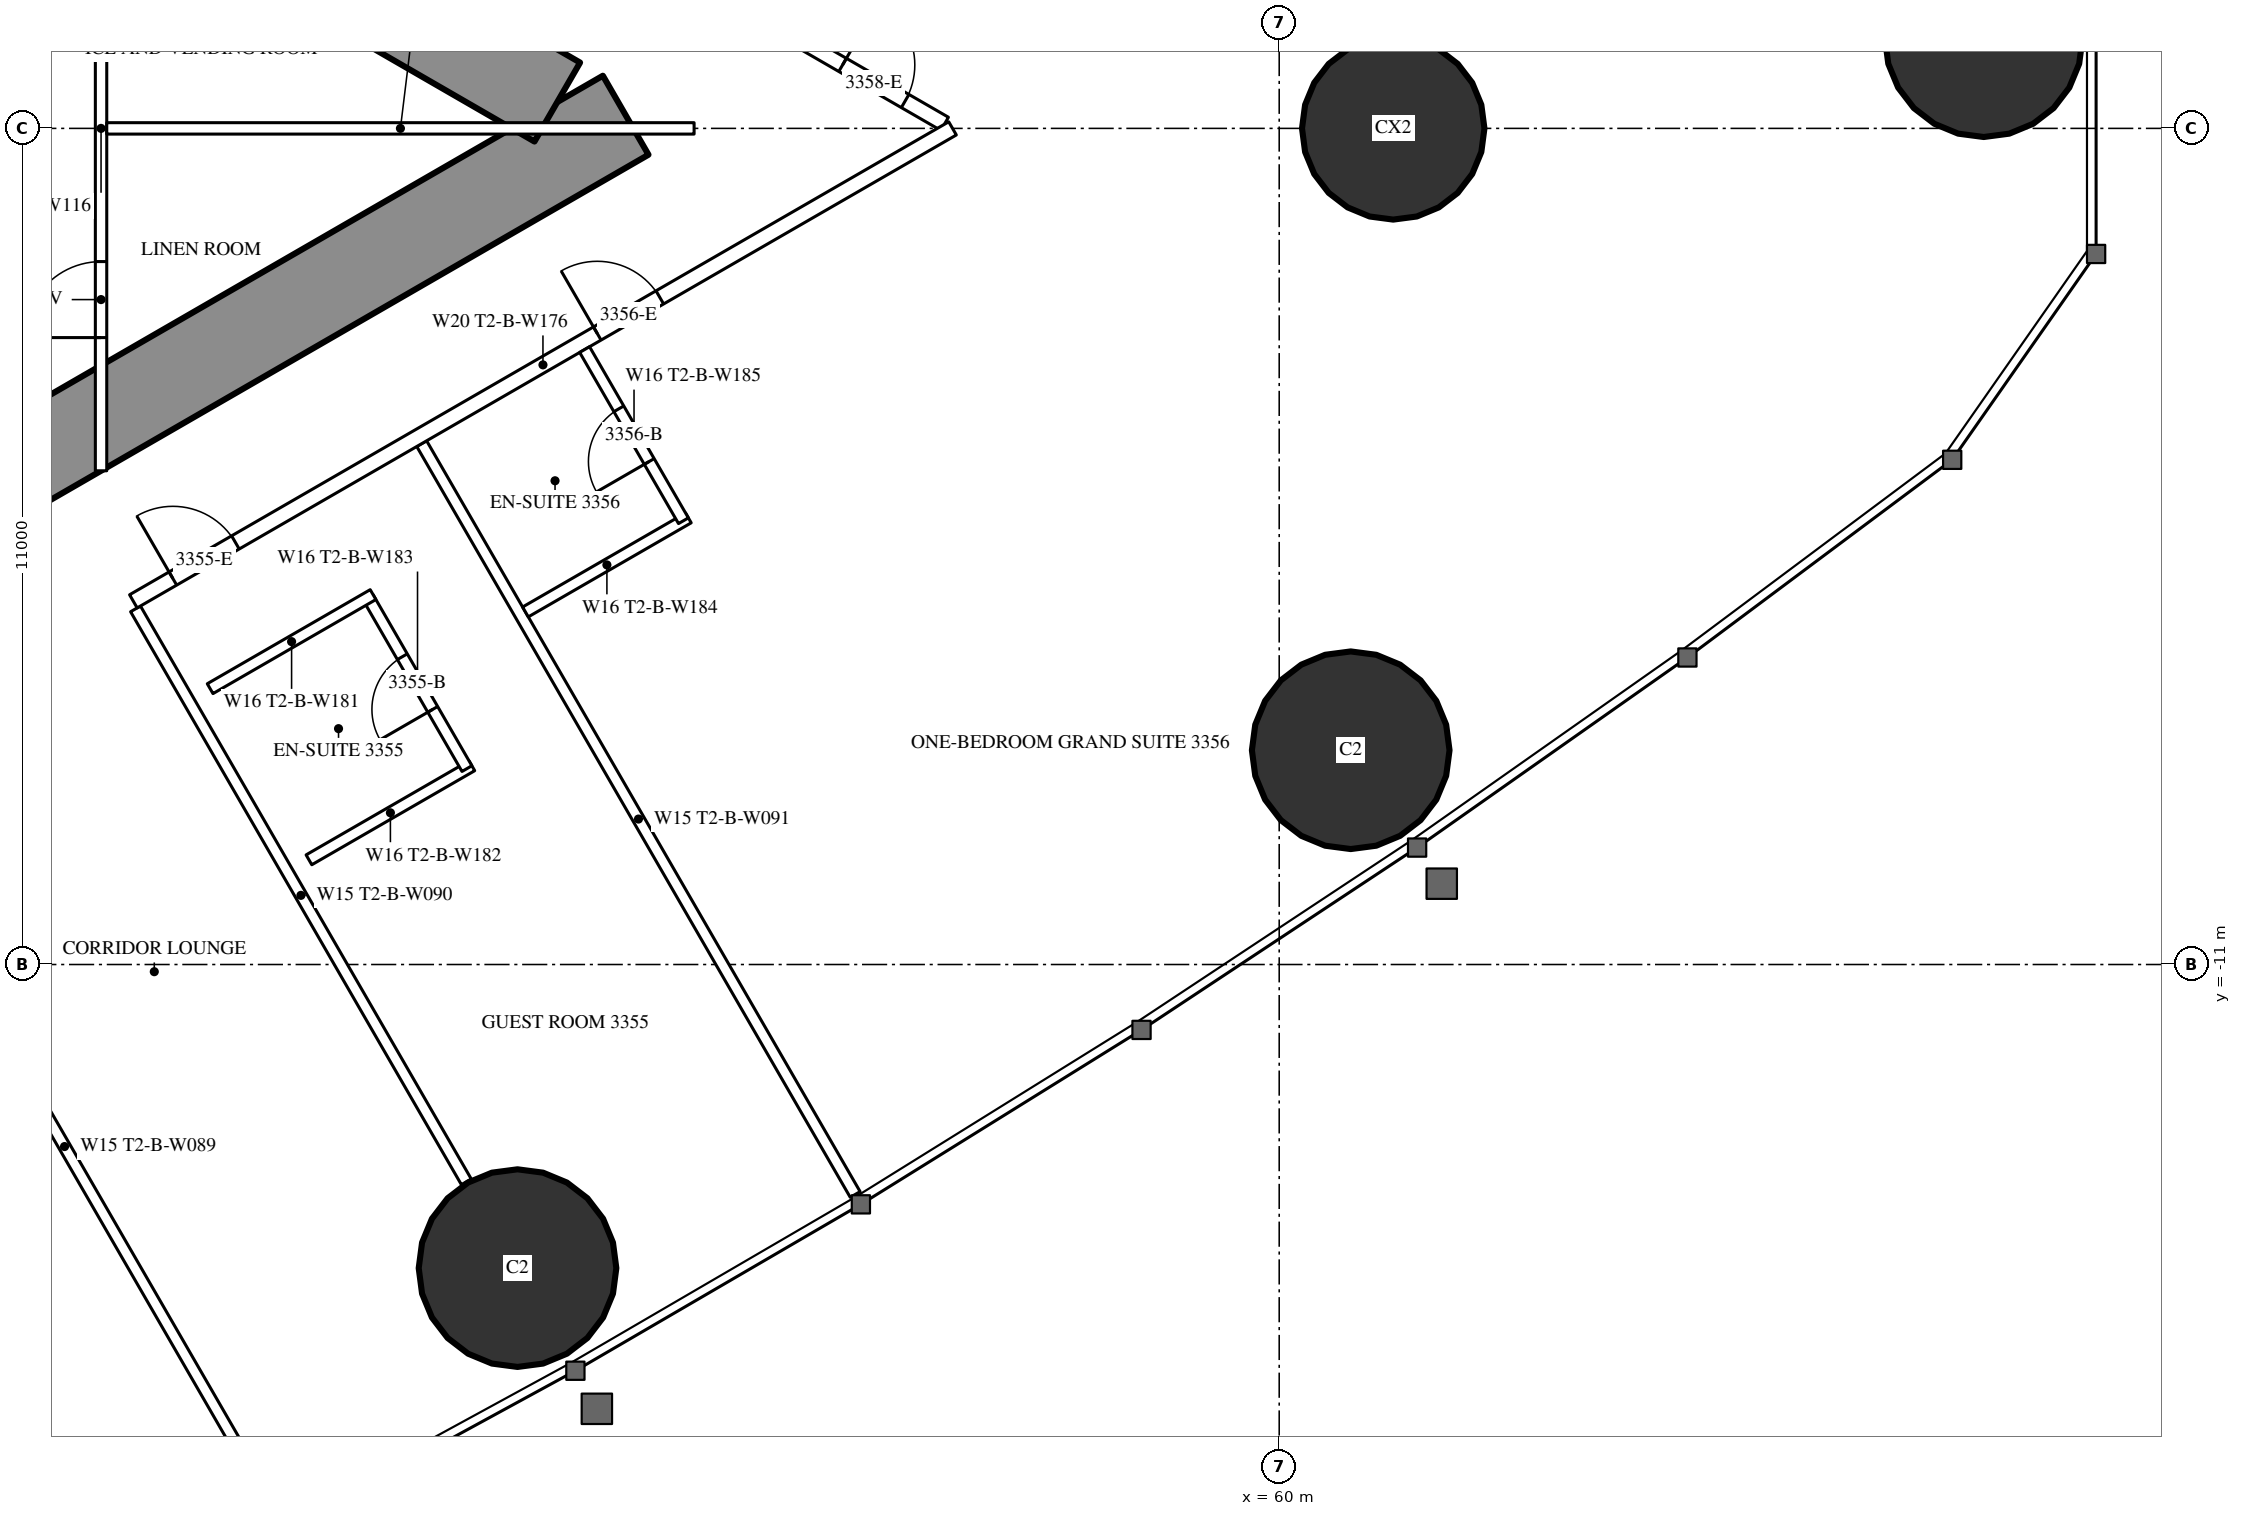
"""IFC4 building model, lengths in metres.
Left out: names, types, materials, properties, quantities, classifications, styles, units other than length and angle.
Written with IfcOpenShell. Run it as: python <this file> out.ifc"""

import sys

from ifc_helpers import new_model, si_unit, direction, frame, frame_2d, origin, origin_2d, place, context, subcontext, project, spatial, rectangle, circle, hollow_circle, extrude, element, fill, save


model = new_model("IFC4")
c1 = context("Model", 3, precision=1e-05, world=origin(), true_north=direction((0.0, 1.0)))
c2 = subcontext(c1, "Body", "Model", "MODEL_VIEW")
j1 = project(units=[si_unit("LENGTHUNIT", "METRE"), si_unit("PLANEANGLEUNIT", "RADIAN")], contexts=[c1])
p1 = place(None, origin())
s1 = spatial("IfcSite", under=j1, at=p1, CompositionType="ELEMENT")
p2 = place(p1, origin())
s2 = spatial("IfcBuilding", under=s1, at=p2, CompositionType="ELEMENT")
p3 = place(p2, frame((0.0, 0.0, 125.6)))
s3 = spatial("IfcBuildingStorey", under=s2, at=p3, CompositionType="ELEMENT", Elevation=125.6)
for number, where, z_axis, x_axis in (
    (1, (69.269, 1.187, 0.0), (0.0, 0.0, 1.0), (1.0, 0.0, 0.0)),
    (2, (49.979, -14.994, 0.0), (0.0, 0.0, 1.0), (1.0, 0.0, 0.0)),
    (3, (60.941, -8.181, 0.0), (0.0, 0.0, 1.0), (1.0, 0.0, 0.0)),
):
    element("IfcColumn", number, at=place(p3, frame(where, z_axis=z_axis, x_axis=x_axis)), inside=s3, PredefinedType="COLUMN", context=c2, shape_type="SweptSolid", body=[
        extrude(hollow_circle(Radius=1.3, WallThickness=0.1, at=origin_2d()), origin(), (0.0, 0.0, 1.0), 3.5),
    ])
p4 = place(p3, frame((61.5, 0.0, 0.0), z_axis=(0.0, 0.0, 1.0), x_axis=(1.0, 0.0, 0.0)))
e4 = element("IfcColumn", 4, at=p4, inside=s3, PredefinedType="COLUMN", context=c2, shape_type="SweptSolid", body=[
    extrude(circle(Radius=1.2, at=origin_2d()), origin(), (0.0, 0.0, 1.0), 3.5),
])
p5 = place(p3, frame((27.2, -13.8, 0.0), z_axis=(0.0, 0.0, 1.0), x_axis=(0.866027159892, 0.499996958321, 0.0)))
e5 = element("IfcWall", 5, at=p5, inside=s3, PredefinedType="SHEAR", context=c2, shape_type="SweptSolid", body=[
    extrude(rectangle(XDim=27.947, YDim=1.2, at=frame_2d((13.973, 0.0))), origin(), (0.0, 0.0, 1.0), 3.5),
])
p6 = place(p5, frame((4.6, 0.0, 0.0)))
e6 = element("IfcOpeningElement", 6, at=p6, cuts=e5, PredefinedType="OPENING", context=c2, shape_type="SweptSolid", body=[
    extrude(rectangle(XDim=1.0, YDim=2.2, at=frame_2d((0.5, 1.1))), frame((0.0, 0.61, 0.0), z_axis=(0.0, -1.0, 0.0), x_axis=(1.0, 0.0, 0.0)), (0.0, 0.0, 1.0), 1.22),
])
p7 = place(p5, frame((13.395, 0.0, 0.0)))
e7 = element("IfcOpeningElement", 7, at=p7, cuts=e5, PredefinedType="OPENING", context=c2, shape_type="SweptSolid", body=[
    extrude(rectangle(XDim=1.8, YDim=2.2, at=frame_2d((0.9, 1.1))), frame((0.0, 0.61, 0.0), z_axis=(0.0, -1.0, 0.0), x_axis=(1.0, 0.0, 0.0)), (0.0, 0.0, 1.0), 1.22),
])
p8 = place(p3, frame((27.2, 13.8, 0.0), z_axis=(0.0, 0.0, 1.0), x_axis=(0.866024515034, -0.500001539357, 0.0)))
e8 = element("IfcWall", 8, at=p8, inside=s3, PredefinedType="SHEAR", context=c2, shape_type="SweptSolid", body=[
    extrude(rectangle(XDim=26.907, YDim=1.2, at=frame_2d((13.454, 0.0))), origin(), (0.0, 0.0, 1.0), 3.5),
])
p9 = place(p8, frame((4.6, 0.0, 0.0)))
e9 = element("IfcOpeningElement", 9, at=p9, cuts=e8, PredefinedType="OPENING", context=c2, shape_type="SweptSolid", body=[
    extrude(rectangle(XDim=1.0, YDim=2.2, at=frame_2d((0.5, 1.1))), frame((0.0, 0.61, 0.0), z_axis=(0.0, -1.0, 0.0), x_axis=(1.0, 0.0, 0.0)), (0.0, 0.0, 1.0), 1.22),
])
p10 = place(p8, frame((13.395, 0.0, 0.0)))
e10 = element("IfcOpeningElement", 10, at=p10, cuts=e8, PredefinedType="OPENING", context=c2, shape_type="SweptSolid", body=[
    extrude(rectangle(XDim=1.8, YDim=2.2, at=frame_2d((0.9, 1.1))), frame((0.0, 0.61, 0.0), z_axis=(0.0, -1.0, 0.0), x_axis=(1.0, 0.0, 0.0)), (0.0, 0.0, 1.0), 1.22),
])
p11 = place(p3, frame((41.19, -8.494, 0.0), z_axis=(0.0, 0.0, 1.0), x_axis=(0.49999258054, -0.866029687369, 0.0)))
e11 = element("IfcWall", 11, at=p11, inside=s3, PredefinedType="PARTITIONING", context=c2, shape_type="SweptSolid", body=[
    extrude(rectangle(XDim=11.318, YDim=0.15, at=frame_2d((5.659, 0.0))), origin(), (0.0, 0.0, 1.0), 3.25),
])
p12 = place(p3, frame((44.954, -6.321, 0.0), z_axis=(0.0, 0.0, 1.0), x_axis=(0.500018676722, -0.866014620505, 0.0)))
e12 = element("IfcWall", 12, at=p12, inside=s3, PredefinedType="PARTITIONING", context=c2, shape_type="SweptSolid", body=[
    extrude(rectangle(XDim=8.704, YDim=0.15, at=frame_2d((4.352, 0.0))), origin(), (0.0, 0.0, 1.0), 2.2),
])
p13 = place(p3, frame((48.719, -4.147, 0.0), z_axis=(0.0, 0.0, 1.0), x_axis=(0.499990498062, -0.866030889661, 0.0)))
e13 = element("IfcWall", 13, at=p13, inside=s3, PredefinedType="PARTITIONING", context=c2, shape_type="SweptSolid", body=[
    extrude(rectangle(XDim=11.406, YDim=0.15, at=frame_2d((5.703, 0.0))), origin(), (0.0, 0.0, 1.0), 3.25),
])
p14 = place(p3, frame((36.834, 10.894, 0.0), z_axis=(0.0, 0.0, 1.0), x_axis=(0.866028157229, -0.499995230863, 0.0)))
e14 = element("IfcWall", 14, at=p14, inside=s3, PredefinedType="PARTITIONING", context=c2, shape_type="SweptSolid", body=[
    extrude(rectangle(XDim=21.667, YDim=0.2, at=frame_2d((10.833, 0.0))), origin(), (0.0, 0.0, 1.0), 3.25),
])
p15 = place(p14, frame((20.117, 0.0, 0.0)))
e15 = element("IfcOpeningElement", 15, at=p15, cuts=e14, PredefinedType="OPENING", context=c2, shape_type="SweptSolid", body=[
    extrude(rectangle(XDim=0.95, YDim=2.2, at=frame_2d((0.475, 1.1))), frame((0.0, 0.11, 0.0), z_axis=(0.0, -1.0, 0.0), x_axis=(1.0, 0.0, 0.0)), (0.0, 0.0, 1.0), 0.22),
])
p16 = place(p14, frame((14.04, 0.0, 0.0)))
e16 = element("IfcOpeningElement", 16, at=p16, cuts=e14, PredefinedType="OPENING", context=c2, shape_type="SweptSolid", body=[
    extrude(rectangle(XDim=0.95, YDim=2.2, at=frame_2d((0.475, 1.1))), frame((0.0, 0.11, 0.0), z_axis=(0.0, -1.0, 0.0), x_axis=(1.0, 0.0, 0.0)), (0.0, 0.0, 1.0), 0.22),
])
p17 = place(p14, frame((7.697, 0.0, 0.0)))
e17 = element("IfcOpeningElement", 17, at=p17, cuts=e14, PredefinedType="OPENING", context=c2, shape_type="SweptSolid", body=[
    extrude(rectangle(XDim=0.95, YDim=2.2, at=frame_2d((0.475, 1.1))), frame((0.0, 0.11, 0.0), z_axis=(0.0, -1.0, 0.0), x_axis=(1.0, 0.0, 0.0)), (0.0, 0.0, 1.0), 0.22),
])
p18 = place(p14, frame((3.35, 0.0, 0.0)))
e18 = element("IfcOpeningElement", 18, at=p18, cuts=e14, PredefinedType="OPENING", context=c2, shape_type="SweptSolid", body=[
    extrude(rectangle(XDim=1.0, YDim=2.2, at=frame_2d((0.5, 1.1))), frame((0.0, 0.11, 0.0), z_axis=(0.0, -1.0, 0.0), x_axis=(1.0, 0.0, 0.0)), (0.0, 0.0, 1.0), 0.22),
])
p19 = place(p3, frame((44.925, -6.222, 0.0), z_axis=(0.0, 0.0, 1.0), x_axis=(0.866020269055, 0.500008893506, 0.0)))
e19 = element("IfcWall", 19, at=p19, inside=s3, PredefinedType="PARTITIONING", context=c2, shape_type="SweptSolid", body=[
    extrude(rectangle(XDim=12.444, YDim=0.2, at=frame_2d((6.222, 0.0))), origin(), (0.0, 0.0, 1.0), 3.25),
])
p20 = place(p19, frame((0.6, 0.0, 0.0)))
e20 = element("IfcOpeningElement", 20, at=p20, cuts=e19, PredefinedType="OPENING", context=c2, shape_type="SweptSolid", body=[
    extrude(rectangle(XDim=0.95, YDim=2.2, at=frame_2d((0.475, 1.1))), frame((0.0, 0.11, 0.0), z_axis=(0.0, -1.0, 0.0), x_axis=(1.0, 0.0, 0.0)), (0.0, 0.0, 1.0), 0.22),
])
p21 = place(p19, frame((7.047, 0.0, 0.0)))
e21 = element("IfcOpeningElement", 21, at=p21, cuts=e19, PredefinedType="OPENING", context=c2, shape_type="SweptSolid", body=[
    extrude(rectangle(XDim=0.95, YDim=2.2, at=frame_2d((0.475, 1.1))), frame((0.0, 0.11, 0.0), z_axis=(0.0, -1.0, 0.0), x_axis=(1.0, 0.0, 0.0)), (0.0, 0.0, 1.0), 0.22),
])
p22 = place(p3, frame((47.235, -9.623, 0.0), z_axis=(0.0, 0.0, 1.0), x_axis=(0.866006523861, 0.500032699561, 0.0)))
e22 = element("IfcWall", 22, at=p22, inside=s3, PredefinedType="PARTITIONING", context=c2, shape_type="SweptSolid", body=[
    extrude(rectangle(XDim=2.475, YDim=0.15, at=frame_2d((1.237, 0.0))), origin(), (0.0, 0.0, 1.0), 3.25),
])
p23 = place(p3, frame((48.013, -6.171, 0.0), z_axis=(0.0, 0.0, 1.0), x_axis=(0.500006934395, -0.866021400173, 0.0)))
e23 = element("IfcWall", 23, at=p23, inside=s3, PredefinedType="PARTITIONING", context=c2, shape_type="SweptSolid", body=[
    extrude(rectangle(XDim=2.6, YDim=0.15, at=frame_2d((1.3, 0.0))), origin(), (0.0, 0.0, 1.0), 3.25),
])
p24 = place(p23, frame((0.9, 0.0, 0.0)))
e24 = element("IfcOpeningElement", 24, at=p24, cuts=e23, PredefinedType="OPENING", context=c2, shape_type="SweptSolid", body=[
    extrude(rectangle(XDim=0.8, YDim=2.2, at=frame_2d((0.4, 1.1))), frame((0.0, 0.085, 0.0), z_axis=(0.0, -1.0, 0.0), x_axis=(1.0, 0.0, 0.0)), (0.0, 0.0, 1.0), 0.17),
])
p25 = place(p3, frame((45.935, -7.371, 0.0), z_axis=(0.0, 0.0, 1.0), x_axis=(0.866031185235, 0.4999899861, 0.0)))
e25 = element("IfcWall", 25, at=p25, inside=s3, PredefinedType="PARTITIONING", context=c2, shape_type="SweptSolid", body=[
    extrude(rectangle(XDim=2.475, YDim=0.15, at=frame_2d((1.238, 0.0))), origin(), (0.0, 0.0, 1.0), 3.25),
])
p26 = place(p3, frame((50.083, -6.362, 0.0), z_axis=(0.0, 0.0, 1.0), x_axis=(0.866006523861, 0.500032699561, 0.0)))
e26 = element("IfcWall", 26, at=p26, inside=s3, PredefinedType="PARTITIONING", context=c2, shape_type="SweptSolid", body=[
    extrude(rectangle(XDim=2.475, YDim=0.15, at=frame_2d((1.237, 0.0))), origin(), (0.0, 0.0, 1.0), 3.25),
])
p27 = place(p3, frame((50.862, -2.91, 0.0), z_axis=(0.0, 0.0, 1.0), x_axis=(0.500047596559, -0.865997922154, 0.0)))
e27 = element("IfcWall", 27, at=p27, inside=s3, PredefinedType="PARTITIONING", context=c2, shape_type="SweptSolid", body=[
    extrude(rectangle(XDim=2.6, YDim=0.15, at=frame_2d((1.3, 0.0))), origin(), (0.0, 0.0, 1.0), 3.25),
])
p28 = place(p27, frame((0.9, 0.0, 0.0)))
e28 = element("IfcOpeningElement", 28, at=p28, cuts=e27, PredefinedType="OPENING", context=c2, shape_type="SweptSolid", body=[
    extrude(rectangle(XDim=0.8, YDim=2.2, at=frame_2d((0.4, 1.1))), frame((0.0, 0.085, 0.0), z_axis=(0.0, -1.0, 0.0), x_axis=(1.0, 0.0, 0.0)), (0.0, 0.0, 1.0), 0.17),
])
p29 = place(p3, frame((44.5, -4.505, 0.0), z_axis=(0.0, 0.0, 1.0), x_axis=(0.0, 1.0, 0.0)))
e29 = element("IfcWall", 29, at=p29, inside=s3, PredefinedType="PARTITIONING", context=c2, shape_type="SweptSolid", body=[
    extrude(rectangle(XDim=9.009, YDim=0.15, at=frame_2d((4.505, 0.0))), origin(), (0.0, 0.0, 1.0), 2.45),
])
p30 = place(p29, frame((1.752, 0.0, 0.0)))
e30 = element("IfcOpeningElement", 30, at=p30, cuts=e29, PredefinedType="OPENING", context=c2, shape_type="SweptSolid", body=[
    extrude(rectangle(XDim=1.0, YDim=2.2, at=frame_2d((0.5, 1.1))), frame((0.0, 0.085, 0.0), z_axis=(0.0, -1.0, 0.0), x_axis=(1.0, 0.0, 0.0)), (0.0, 0.0, 1.0), 0.17),
])
p31 = place(p29, frame((6.257, 0.0, 0.0)))
e31 = element("IfcOpeningElement", 31, at=p31, cuts=e29, PredefinedType="OPENING", context=c2, shape_type="SweptSolid", body=[
    extrude(rectangle(XDim=1.0, YDim=2.2, at=frame_2d((0.5, 1.1))), frame((0.0, 0.085, 0.0), z_axis=(0.0, -1.0, 0.0), x_axis=(1.0, 0.0, 0.0)), (0.0, 0.0, 1.0), 0.17),
])
p32 = place(p3, frame((44.575, 0.0, 0.0), z_axis=(0.0, 0.0, 1.0), x_axis=(1.0, 0.0, 0.0)))
e32 = element("IfcWall", 32, at=p32, inside=s3, PredefinedType="PARTITIONING", context=c2, shape_type="SweptSolid", body=[
    extrude(rectangle(XDim=7.727, YDim=0.15, at=frame_2d((3.864, 0.0))), origin(), (0.0, 0.0, 1.0), 2.2),
])
p33 = place(p24, origin())
e33 = element("IfcDoor", 33, at=p33, inside=s3, OperationType="SINGLE_SWING_RIGHT", PredefinedType="DOOR", context=c2, shape_type="SweptSolid", body=[
    extrude(rectangle(XDim=0.8, YDim=2.2, at=frame_2d((0.4, 1.1))), frame((0.0, 0.025, 0.0), z_axis=(0.0, -1.0, 0.0), x_axis=(1.0, 0.0, 0.0)), (0.0, 0.0, 1.0), 0.05),
])
fill(e24, e33)
p34 = place(p20, origin())
e34 = element("IfcDoor", 34, at=p34, inside=s3, OperationType="SINGLE_SWING_LEFT", PredefinedType="DOOR", context=c2, shape_type="SweptSolid", body=[
    extrude(rectangle(XDim=0.95, YDim=2.2, at=frame_2d((0.475, 1.1))), frame((0.0, 0.025, 0.0), z_axis=(0.0, -1.0, 0.0), x_axis=(1.0, 0.0, 0.0)), (0.0, 0.0, 1.0), 0.05),
])
fill(e20, e34)
p35 = place(p28, origin())
e35 = element("IfcDoor", 35, at=p35, inside=s3, OperationType="SINGLE_SWING_RIGHT", PredefinedType="DOOR", context=c2, shape_type="SweptSolid", body=[
    extrude(rectangle(XDim=0.8, YDim=2.2, at=frame_2d((0.4, 1.1))), frame((0.0, 0.025, 0.0), z_axis=(0.0, -1.0, 0.0), x_axis=(1.0, 0.0, 0.0)), (0.0, 0.0, 1.0), 0.05),
])
fill(e28, e35)
p36 = place(p21, origin())
e36 = element("IfcDoor", 36, at=p36, inside=s3, OperationType="SINGLE_SWING_LEFT", PredefinedType="DOOR", context=c2, shape_type="SweptSolid", body=[
    extrude(rectangle(XDim=0.95, YDim=2.2, at=frame_2d((0.475, 1.1))), frame((0.0, 0.025, 0.0), z_axis=(0.0, -1.0, 0.0), x_axis=(1.0, 0.0, 0.0)), (0.0, 0.0, 1.0), 0.05),
])
fill(e21, e36)
p37 = place(p15, origin())
e37 = element("IfcDoor", 37, at=p37, inside=s3, OperationType="SINGLE_SWING_LEFT", PredefinedType="DOOR", context=c2, shape_type="SweptSolid", body=[
    extrude(rectangle(XDim=0.95, YDim=2.2, at=frame_2d((0.475, 1.1))), frame((0.0, 0.025, 0.0), z_axis=(0.0, -1.0, 0.0), x_axis=(1.0, 0.0, 0.0)), (0.0, 0.0, 1.0), 0.05),
])
fill(e15, e37)
p38 = place(p30, origin())
e38 = element("IfcDoor", 38, at=p38, inside=s3, OperationType="SINGLE_SWING_LEFT", PredefinedType="DOOR", context=c2, shape_type="SweptSolid", body=[
    extrude(rectangle(XDim=1.0, YDim=2.2, at=frame_2d((0.5, 1.1))), frame((0.0, 0.025, 0.0), z_axis=(0.0, -1.0, 0.0), x_axis=(1.0, 0.0, 0.0)), (0.0, 0.0, 1.0), 0.05),
])
fill(e30, e38)
save(model, sys.argv[1])
